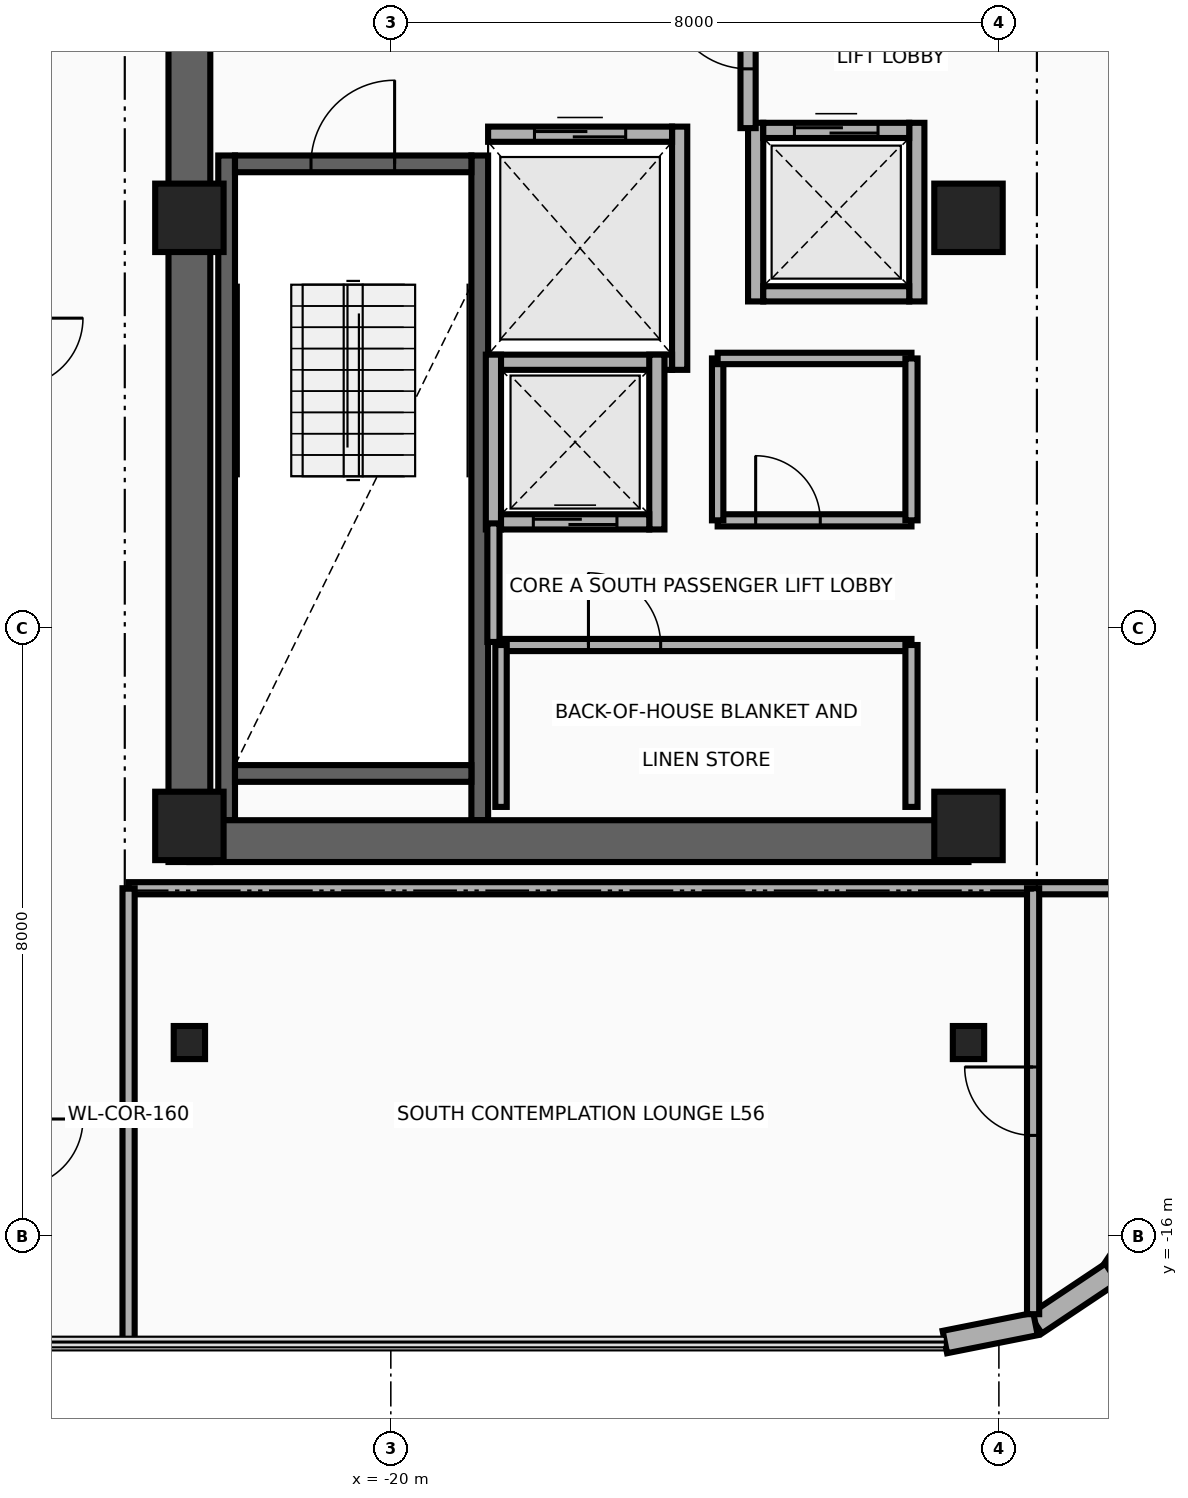
"""IFC4 building model, lengths in metres.
Left out: names, types, materials, properties, quantities, classifications, styles, units other than length and angle.
Written with IfcOpenShell. Run it as: python <this file> out.ifc"""

import sys

from ifc_helpers import new_model, si_unit, direction, frame, frame_2d, origin, origin_2d, place, context, subcontext, project, spatial, rectangle, i_section, extrude, source, transform, mapped, element, fill, save


model = new_model("IFC4")
c1 = context("Model", 3, precision=1e-05, world=origin(), true_north=direction((0.0, 1.0)))
c2 = subcontext(c1, "Body", "Model", "MODEL_VIEW")
j1 = project(units=[si_unit("LENGTHUNIT", "METRE"), si_unit("PLANEANGLEUNIT", "RADIAN")], contexts=[c1])
p1 = place(None, origin())
s1 = spatial("IfcSite", under=j1, at=p1, CompositionType="ELEMENT")
p2 = place(p1, origin())
s2 = spatial("IfcBuilding", under=s1, at=p2, CompositionType="ELEMENT")
p3 = place(p2, frame((0.0, 0.0, 219.5)))
s3 = spatial("IfcBuildingStorey", under=s2, at=p3, CompositionType="ELEMENT", Elevation=219.5)
for number, where, z_axis, x_axis in (
    (1, (-22.16, -10.525, 0.0), (0.0, 0.0, 1.0), (0.0, 1.0, 0.0)),
    (2, (-18.83, -10.525, 0.0), (0.0, 0.0, 1.0), (0.0, 1.0, 0.0)),
):
    element("IfcWall", number, at=place(p3, frame(where, z_axis=z_axis, x_axis=x_axis)), inside=s3, PredefinedType="SHEAR", context=c2, shape_type="SweptSolid", body=[
        extrude(rectangle(XDim=8.745, YDim=0.22, at=frame_2d((4.373, 0.0))), origin(), (0.0, 0.0, 1.0), 3.26),
    ])
p4 = place(p3, frame((-22.05, -9.91, 0.0), z_axis=(0.0, 0.0, 1.0), x_axis=(1.0, 0.0, 0.0)))
e3 = element("IfcWall", 3, at=p4, inside=s3, PredefinedType="SHEAR", context=c2, shape_type="SweptSolid", body=[
    extrude(rectangle(XDim=3.11, YDim=0.22, at=frame_2d((1.555, 0.0))), origin(), (0.0, 0.0, 1.0), 3.26),
])
p5 = place(p3, frame((-22.05, -1.89, 0.0), z_axis=(0.0, 0.0, 1.0), x_axis=(1.0, 0.0, 0.0)))
e4 = element("IfcWall", 4, at=p5, inside=s3, PredefinedType="SHEAR", context=c2, shape_type="SweptSolid", body=[
    extrude(rectangle(XDim=3.11, YDim=0.22, at=frame_2d((1.555, 0.0))), origin(), (0.0, 0.0, 1.0), 3.26),
])
p6 = place(p5, frame((1.0, 0.0, 0.0)))
e5 = element("IfcOpeningElement", 5, at=p6, cuts=e4, PredefinedType="OPENING", context=c2, shape_type="SweptSolid", body=[
    extrude(rectangle(XDim=1.1, YDim=2.15, at=frame_2d((0.55, 1.075))), frame((0.0, 0.125, 0.0), z_axis=(0.0, -1.0, 0.0), x_axis=(1.0, 0.0, 0.0)), (0.0, 0.0, 1.0), 0.25),
])
p7 = place(p3, frame((-22.65, -11.075, 0.0), z_axis=(0.0, 0.0, 1.0), x_axis=(0.0, 1.0, 0.0)))
e6 = element("IfcWall", 6, at=p7, inside=s3, PredefinedType="SHEAR", context=c2, shape_type="SweptSolid", body=[
    extrude(rectangle(XDim=22.15, YDim=0.55, at=frame_2d((11.075, 0.0))), origin(), (0.0, 0.0, 1.0), 3.26),
])
p8 = place(p3, frame((-22.65, -10.8, 0.0), z_axis=(0.0, 0.0, 1.0), x_axis=(1.0, 0.0, 0.0)))
e7 = element("IfcWall", 7, at=p8, inside=s3, PredefinedType="SHEAR", context=c2, shape_type="SweptSolid", body=[
    extrude(rectangle(XDim=10.25, YDim=0.55, at=frame_2d((5.125, 0.0))), origin(), (0.0, 0.0, 1.0), 3.26),
])
m1 = source(origin(), c2, "Body", "SweptSolid", [
    extrude(rectangle(XDim=0.9, YDim=0.9, at=origin_2d()), origin(), (0.0, 0.0, 1.0), 3.5),
])
for number, where, z_axis, x_axis in (
    (8, (-22.65, -10.6, 0.0), (0.0, 0.0, 1.0), (1.0, 0.0, 0.0)),
    (9, (-12.4, -10.6, 0.0), (0.0, 0.0, 1.0), (1.0, 0.0, 0.0)),
    (10, (-22.65, -2.6, 0.0), (0.0, 0.0, 1.0), (1.0, 0.0, 0.0)),
    (11, (-12.4, -2.6, 0.0), (0.0, 0.0, 1.0), (1.0, 0.0, 0.0)),
):
    element("IfcColumn", number, at=place(p3, frame(where, z_axis=z_axis, x_axis=x_axis)), inside=s3, PredefinedType="COLUMN", context=c2, shape_type="MappedRepresentation", body=[
        mapped(m1, transform((0.0, 0.0, 0.0), x_axis=(1.0, 0.0, 0.0), y_axis=(0.0, 1.0, 0.0), z_axis=(0.0, 0.0, 1.0), scale=1.0)),
    ])
m2 = source(origin(), c2, "Body", "SweptSolid", [
    extrude(i_section(OverallWidth=0.412, OverallDepth=0.435, WebThickness=0.036, FlangeThickness=0.057, at=origin_2d()), origin(), (0.0, 0.0, 1.0), 3.5),
])
for number, where, z_axis, x_axis in (
    (12, (-22.65, -13.45, 0.0), (0.0, 0.0, 1.0), (1.0, 0.0, 0.0)),
    (13, (-12.4, -13.45, 0.0), (0.0, 0.0, 1.0), (1.0, 0.0, 0.0)),
):
    element("IfcColumn", number, at=place(p3, frame(where, z_axis=z_axis, x_axis=x_axis)), inside=s3, PredefinedType="COLUMN", context=c2, shape_type="MappedRepresentation", body=[
        mapped(m2, transform((0.0, 0.0, 0.0), x_axis=(1.0, 0.0, 0.0), y_axis=(0.0, 1.0, 0.0), z_axis=(0.0, 0.0, 1.0), scale=1.0)),
    ])
for number, where, z_axis, x_axis in (
    (14, (-9.847, -15.482, 0.0), (0.0, 0.0, 1.0), (-0.556, -0.831, 0.0)),
    (15, (-10.517, -16.483, 0.0), (0.0, 0.0, 1.0), (-0.831, -0.556, 0.0)),
):
    element("IfcWall", number, at=place(p3, frame(where, z_axis=z_axis, x_axis=x_axis)), inside=s3, PredefinedType="SOLIDWALL", context=c2, shape_type="SweptSolid", body=[
        extrude(rectangle(XDim=1.205, YDim=0.3, at=frame_2d((0.603, 0.0))), origin(), (0.0, 0.0, 1.0), 3.26),
    ])
p9 = place(p3, frame((-11.518, -17.153, 0.0), z_axis=(0.0, 0.0, 1.0), x_axis=(-0.980804027463, -0.194996050505, 0.0)))
e16 = element("IfcWall", 16, at=p9, inside=s3, PredefinedType="SOLIDWALL", context=c2, shape_type="SweptSolid", body=[
    extrude(rectangle(XDim=1.216, YDim=0.3, at=frame_2d((0.608, 0.0))), origin(), (0.0, 0.0, 1.0), 3.26),
])
p10 = place(p3, frame((-16.2, -4.6, 0.0), z_axis=(0.0, 0.0, 1.0), x_axis=(0.0, 1.0, 0.0)))
e17 = element("IfcWall", 17, at=p10, inside=s3, PredefinedType="MOVABLE", context=c2, shape_type="SweptSolid", body=[
    extrude(rectangle(XDim=3.2, YDim=0.2, at=frame_2d((1.6, 0.0))), origin(), (0.0, 0.0, 1.0), 3.26),
])
p11 = place(p3, frame((-18.72, -4.5, 0.0), z_axis=(0.0, 0.0, 1.0), x_axis=(1.0, 0.0, 0.0)))
e18 = element("IfcWall", 18, at=p11, inside=s3, PredefinedType="MOVABLE", context=c2, shape_type="SweptSolid", body=[
    extrude(rectangle(XDim=2.42, YDim=0.2, at=frame_2d((1.21, 0.0))), origin(), (0.0, 0.0, 1.0), 3.26),
])
p12 = place(p3, frame((-18.72, -1.5, 0.0), z_axis=(0.0, 0.0, 1.0), x_axis=(1.0, 0.0, 0.0)))
e19 = element("IfcWall", 19, at=p12, inside=s3, PredefinedType="MOVABLE", context=c2, shape_type="SweptSolid", body=[
    extrude(rectangle(XDim=2.42, YDim=0.2, at=frame_2d((1.21, 0.0))), origin(), (0.0, 0.0, 1.0), 3.26),
])
p13 = place(p12, frame((0.61, 0.0, 0.0)))
e20 = element("IfcOpeningElement", 20, at=p13, cuts=e19, PredefinedType="OPENING", context=c2, shape_type="SweptSolid", body=[
    extrude(rectangle(XDim=1.2, YDim=2.1, at=frame_2d((0.6, 1.05))), frame((0.0, 0.115, 0.0), z_axis=(0.0, -1.0, 0.0), x_axis=(1.0, 0.0, 0.0)), (0.0, 0.0, 1.0), 0.23),
])
for number, where, z_axis, x_axis in (
    (21, (-18.65, -6.7, 0.0), (0.0, 0.0, 1.0), (0.0, 1.0, 0.0)),
    (22, (-16.5, -6.7, 0.0), (0.0, 0.0, 1.0), (0.0, 1.0, 0.0)),
):
    element("IfcWall", number, at=place(p3, frame(where, z_axis=z_axis, x_axis=x_axis)), inside=s3, PredefinedType="MOVABLE", context=c2, shape_type="SweptSolid", body=[
        extrude(rectangle(XDim=2.3, YDim=0.2, at=frame_2d((1.15, 0.0))), origin(), (0.0, 0.0, 1.0), 3.26),
    ])
p14 = place(p3, frame((-18.55, -6.6, 0.0), z_axis=(0.0, 0.0, 1.0), x_axis=(1.0, 0.0, 0.0)))
e23 = element("IfcWall", 23, at=p14, inside=s3, PredefinedType="MOVABLE", context=c2, shape_type="SweptSolid", body=[
    extrude(rectangle(XDim=1.95, YDim=0.2, at=frame_2d((0.975, 0.0))), origin(), (0.0, 0.0, 1.0), 3.26),
])
p15 = place(p14, frame((0.425, 0.0, 0.0)))
e24 = element("IfcOpeningElement", 24, at=p15, cuts=e23, PredefinedType="OPENING", context=c2, shape_type="SweptSolid", body=[
    extrude(rectangle(XDim=1.1, YDim=2.1, at=frame_2d((0.55, 1.05))), frame((0.0, 0.115, 0.0), z_axis=(0.0, -1.0, 0.0), x_axis=(1.0, 0.0, 0.0)), (0.0, 0.0, 1.0), 0.23),
])
for number, where, z_axis, x_axis in (
    (25, (-15.2, -3.7, 0.0), (0.0, 0.0, 1.0), (0.0, 1.0, 0.0)),
    (26, (-13.08, -3.7, 0.0), (0.0, 0.0, 1.0), (0.0, 1.0, 0.0)),
):
    element("IfcWall", number, at=place(p3, frame(where, z_axis=z_axis, x_axis=x_axis)), inside=s3, PredefinedType="MOVABLE", context=c2, shape_type="SweptSolid", body=[
        extrude(rectangle(XDim=2.35, YDim=0.2, at=frame_2d((1.175, 0.0))), origin(), (0.0, 0.0, 1.0), 3.26),
    ])
p16 = place(p3, frame((-15.1, -3.6, 0.0), z_axis=(0.0, 0.0, 1.0), x_axis=(1.0, 0.0, 0.0)))
e27 = element("IfcWall", 27, at=p16, inside=s3, PredefinedType="MOVABLE", context=c2, shape_type="SweptSolid", body=[
    extrude(rectangle(XDim=1.92, YDim=0.2, at=frame_2d((0.96, 0.0))), origin(), (0.0, 0.0, 1.0), 3.26),
])
p17 = place(p3, frame((-15.1, -1.45, 0.0), z_axis=(0.0, 0.0, 1.0), x_axis=(1.0, 0.0, 0.0)))
e28 = element("IfcWall", 28, at=p17, inside=s3, PredefinedType="MOVABLE", context=c2, shape_type="SweptSolid", body=[
    extrude(rectangle(XDim=1.92, YDim=0.2, at=frame_2d((0.96, 0.0))), origin(), (0.0, 0.0, 1.0), 3.26),
])
p18 = place(p17, frame((0.41, 0.0, 0.0)))
e29 = element("IfcOpeningElement", 29, at=p18, cuts=e28, PredefinedType="OPENING", context=c2, shape_type="SweptSolid", body=[
    extrude(rectangle(XDim=1.1, YDim=2.1, at=frame_2d((0.55, 1.05))), frame((0.0, 0.115, 0.0), z_axis=(0.0, -1.0, 0.0), x_axis=(1.0, 0.0, 0.0)), (0.0, 0.0, 1.0), 0.23),
])
p19 = place(p3, frame((-15.3, -1.42, 0.0), z_axis=(0.0, 0.0, 1.0), x_axis=(0.0, 1.0, 0.0)))
e30 = element("IfcWall", 30, at=p19, inside=s3, PredefinedType="PARTITIONING", context=c2, shape_type="SweptSolid", body=[
    extrude(rectangle(XDim=2.67, YDim=0.2, at=frame_2d((1.335, 0.0))), origin(), (0.0, 0.0, 1.0), 3.26),
])
p20 = place(p19, frame((0.78, 0.0, 0.0)))
e31 = element("IfcOpeningElement", 31, at=p20, cuts=e30, PredefinedType="OPENING", context=c2, shape_type="SweptSolid", body=[
    extrude(rectangle(XDim=1.05, YDim=2.15, at=frame_2d((0.525, 1.075))), frame((0.0, 0.115, 0.0), z_axis=(0.0, -1.0, 0.0), x_axis=(1.0, 0.0, 0.0)), (0.0, 0.0, 1.0), 0.23),
])
p21 = place(p3, frame((-18.65, -8.18, 0.0), z_axis=(0.0, 0.0, 1.0), x_axis=(0.0, 1.0, 0.0)))
e32 = element("IfcWall", 32, at=p21, inside=s3, PredefinedType="PARTITIONING", context=c2, shape_type="SweptSolid", body=[
    extrude(rectangle(XDim=1.56, YDim=0.16, at=frame_2d((0.78, 0.0))), origin(), (0.0, 0.0, 1.0), 3.26),
])
p22 = place(p3, frame((-18.55, -8.22, 0.0), z_axis=(0.0, 0.0, 1.0), x_axis=(1.0, 0.0, 0.0)))
e33 = element("IfcWall", 33, at=p22, inside=s3, PredefinedType="PARTITIONING", context=c2, shape_type="SweptSolid", body=[
    extrude(rectangle(XDim=5.4, YDim=0.16, at=frame_2d((2.7, 0.0))), origin(), (0.0, 0.0, 1.0), 3.26),
])
p23 = place(p22, frame((1.15, 0.0, 0.0)))
e34 = element("IfcOpeningElement", 34, at=p23, cuts=e33, PredefinedType="OPENING", context=c2, shape_type="SweptSolid", body=[
    extrude(rectangle(XDim=0.95, YDim=2.15, at=frame_2d((0.475, 1.075))), frame((0.0, 0.095, 0.0), z_axis=(0.0, -1.0, 0.0), x_axis=(1.0, 0.0, 0.0)), (0.0, 0.0, 1.0), 0.19),
])
p24 = place(p3, frame((-18.55, -10.35, 0.0), z_axis=(0.0, 0.0, 1.0), x_axis=(0.0, 1.0, 0.0)))
e35 = element("IfcWall", 35, at=p24, inside=s3, PredefinedType="PARTITIONING", context=c2, shape_type="SweptSolid", body=[
    extrude(rectangle(XDim=2.13, YDim=0.15, at=frame_2d((1.065, 0.0))), origin(), (0.0, 0.0, 1.0), 3.26),
])
p25 = place(p3, frame((-13.15, -10.35, 0.0), z_axis=(0.0, 0.0, 1.0), x_axis=(0.0, 1.0, 0.0)))
e36 = element("IfcWall", 36, at=p25, inside=s3, PredefinedType="PARTITIONING", context=c2, shape_type="SweptSolid", body=[
    extrude(rectangle(XDim=2.13, YDim=0.16, at=frame_2d((1.065, 0.0))), origin(), (0.0, 0.0, 1.0), 3.26),
])
p26 = place(p3, frame((-15.7, -6.58, 0.0), z_axis=(0.0, 0.0, 1.0), x_axis=(1.0, 0.0, 0.0)))
e37 = element("IfcWall", 37, at=p26, inside=s3, PredefinedType="PARTITIONING", context=c2, shape_type="SweptSolid", body=[
    extrude(rectangle(XDim=2.55, YDim=0.16, at=frame_2d((1.275, 0.0))), origin(), (0.0, 0.0, 1.0), 3.26),
])
p27 = place(p26, frame((0.5, 0.0, 0.0)))
e38 = element("IfcOpeningElement", 38, at=p27, cuts=e37, PredefinedType="OPENING", context=c2, shape_type="SweptSolid", body=[
    extrude(rectangle(XDim=0.85, YDim=2.05, at=frame_2d((0.425, 1.025))), frame((0.0, 0.095, 0.0), z_axis=(0.0, -1.0, 0.0), x_axis=(1.0, 0.0, 0.0)), (0.0, 0.0, 1.0), 0.19),
])
p28 = place(p3, frame((-15.7, -6.58, 0.0), z_axis=(0.0, 0.0, 1.0), x_axis=(0.0, 1.0, 0.0)))
e39 = element("IfcWall", 39, at=p28, inside=s3, PredefinedType="PARTITIONING", context=c2, shape_type="SweptSolid", body=[
    extrude(rectangle(XDim=2.13, YDim=0.15, at=frame_2d((1.065, 0.0))), origin(), (0.0, 0.0, 1.0), 3.26),
])
p29 = place(p3, frame((-15.7, -4.45, 0.0), z_axis=(0.0, 0.0, 1.0), x_axis=(1.0, 0.0, 0.0)))
e40 = element("IfcWall", 40, at=p29, inside=s3, PredefinedType="PARTITIONING", context=c2, shape_type="SweptSolid", body=[
    extrude(rectangle(XDim=2.55, YDim=0.15, at=frame_2d((1.275, 0.0))), origin(), (0.0, 0.0, 1.0), 3.26),
])
p30 = place(p3, frame((-13.15, -6.58, 0.0), z_axis=(0.0, 0.0, 1.0), x_axis=(0.0, 1.0, 0.0)))
e41 = element("IfcWall", 41, at=p30, inside=s3, PredefinedType="PARTITIONING", context=c2, shape_type="SweptSolid", body=[
    extrude(rectangle(XDim=2.13, YDim=0.16, at=frame_2d((1.065, 0.0))), origin(), (0.0, 0.0, 1.0), 3.26),
])
p31 = place(p3, frame((-23.45, -11.42, 0.0), z_axis=(0.0, 0.0, 1.0), x_axis=(1.0, 0.0, 0.0)))
e42 = element("IfcWall", 42, at=p31, inside=s3, PredefinedType="PARTITIONING", context=c2, shape_type="SweptSolid", body=[
    extrude(rectangle(XDim=13.84, YDim=0.16, at=frame_2d((6.92, 0.0))), origin(), (0.0, 0.0, 1.0), 2.634),
])
p32 = place(p3, frame((-23.45, -17.39, 0.0), z_axis=(0.0, 0.0, 1.0), x_axis=(0.0, 1.0, 0.0)))
e43 = element("IfcWall", 43, at=p32, inside=s3, PredefinedType="PARTITIONING", context=c2, shape_type="SweptSolid", body=[
    extrude(rectangle(XDim=5.97, YDim=0.16, at=frame_2d((2.985, 0.0))), origin(), (0.0, 0.0, 1.0), 3.26),
])
p33 = place(p3, frame((-11.55, -17.024, 0.0), z_axis=(0.0, 0.0, 1.0), x_axis=(0.0, 1.0, 0.0)))
e44 = element("IfcWall", 44, at=p33, inside=s3, PredefinedType="PARTITIONING", context=c2, shape_type="SweptSolid", body=[
    extrude(rectangle(XDim=5.604, YDim=0.16, at=frame_2d((2.802, 0.0))), origin(), (0.0, 0.0, 1.0), 3.26),
])
p34 = place(p33, frame((2.352, 0.0, 0.0)))
e45 = element("IfcOpeningElement", 45, at=p34, cuts=e44, PredefinedType="OPENING", context=c2, shape_type="SweptSolid", body=[
    extrude(rectangle(XDim=0.9, YDim=2.1, at=frame_2d((0.45, 1.05))), frame((0.0, 0.095, 0.0), z_axis=(0.0, -1.0, 0.0), x_axis=(1.0, 0.0, 0.0)), (0.0, 0.0, 1.0), 0.19),
])
p35 = place(p13, origin())
e46 = element("IfcDoor", 46, at=p35, inside=s3, OperationType="DOUBLE_DOOR_SLIDING", PredefinedType="DOOR", context=c2, shape_type="SweptSolid", body=[
    extrude(rectangle(XDim=1.2, YDim=2.1, at=frame_2d((0.6, 1.05))), frame((0.0, 0.025, 0.0), z_axis=(0.0, -1.0, 0.0), x_axis=(1.0, 0.0, 0.0)), (0.0, 0.0, 1.0), 0.05),
])
fill(e20, e46)
p36 = place(p15, origin())
e47 = element("IfcDoor", 47, at=p36, inside=s3, OperationType="DOUBLE_DOOR_SLIDING", PredefinedType="DOOR", context=c2, shape_type="SweptSolid", body=[
    extrude(rectangle(XDim=1.1, YDim=2.1, at=frame_2d((0.55, 1.05))), frame((0.0, 0.025, 0.0), z_axis=(0.0, -1.0, 0.0), x_axis=(1.0, 0.0, 0.0)), (0.0, 0.0, 1.0), 0.05),
])
fill(e24, e47)
p37 = place(p18, origin())
e48 = element("IfcDoor", 48, at=p37, inside=s3, OperationType="DOUBLE_DOOR_SLIDING", PredefinedType="DOOR", context=c2, shape_type="SweptSolid", body=[
    extrude(rectangle(XDim=1.1, YDim=2.1, at=frame_2d((0.55, 1.05))), frame((0.0, 0.025, 0.0), z_axis=(0.0, -1.0, 0.0), x_axis=(1.0, 0.0, 0.0)), (0.0, 0.0, 1.0), 0.05),
])
fill(e29, e48)
p38 = place(p20, origin())
e49 = element("IfcDoor", 49, at=p38, inside=s3, OperationType="SINGLE_SWING_RIGHT", PredefinedType="DOOR", context=c2, shape_type="SweptSolid", body=[
    extrude(rectangle(XDim=1.05, YDim=2.15, at=frame_2d((0.525, 1.075))), frame((0.0, 0.025, 0.0), z_axis=(0.0, -1.0, 0.0), x_axis=(1.0, 0.0, 0.0)), (0.0, 0.0, 1.0), 0.05),
])
fill(e31, e49)
p39 = place(p6, origin())
e50 = element("IfcDoor", 50, at=p39, inside=s3, OperationType="SINGLE_SWING_RIGHT", PredefinedType="DOOR", context=c2, shape_type="SweptSolid", body=[
    extrude(rectangle(XDim=1.1, YDim=2.15, at=frame_2d((0.55, 1.075))), frame((0.0, 0.025, 0.0), z_axis=(0.0, -1.0, 0.0), x_axis=(1.0, 0.0, 0.0)), (0.0, 0.0, 1.0), 0.05),
])
fill(e5, e50)
p40 = place(p23, origin())
e51 = element("IfcDoor", 51, at=p40, inside=s3, OperationType="SINGLE_SWING_LEFT", PredefinedType="DOOR", context=c2, shape_type="SweptSolid", body=[
    extrude(rectangle(XDim=0.95, YDim=2.15, at=frame_2d((0.475, 1.075))), frame((0.0, 0.025, 0.0), z_axis=(0.0, -1.0, 0.0), x_axis=(1.0, 0.0, 0.0)), (0.0, 0.0, 1.0), 0.05),
])
fill(e34, e51)
p41 = place(p27, origin())
e52 = element("IfcDoor", 52, at=p41, inside=s3, OperationType="SINGLE_SWING_RIGHT", PredefinedType="DOOR", context=c2, shape_type="SweptSolid", body=[
    extrude(rectangle(XDim=0.85, YDim=2.05, at=frame_2d((0.425, 1.025))), frame((0.0, 0.025, 0.0), z_axis=(0.0, -1.0, 0.0), x_axis=(1.0, 0.0, 0.0)), (0.0, 0.0, 1.0), 0.05),
])
fill(e38, e52)
p42 = place(p34, origin())
e53 = element("IfcDoor", 53, at=p42, inside=s3, OperationType="SINGLE_SWING_RIGHT", PredefinedType="DOOR", context=c2, shape_type="SweptSolid", body=[
    extrude(rectangle(XDim=0.9, YDim=2.1, at=frame_2d((0.45, 1.05))), frame((0.0, 0.025, 0.0), z_axis=(0.0, -1.0, 0.0), x_axis=(1.0, 0.0, 0.0)), (0.0, 0.0, 1.0), 0.05),
])
fill(e45, e53)
save(model, sys.argv[1])
